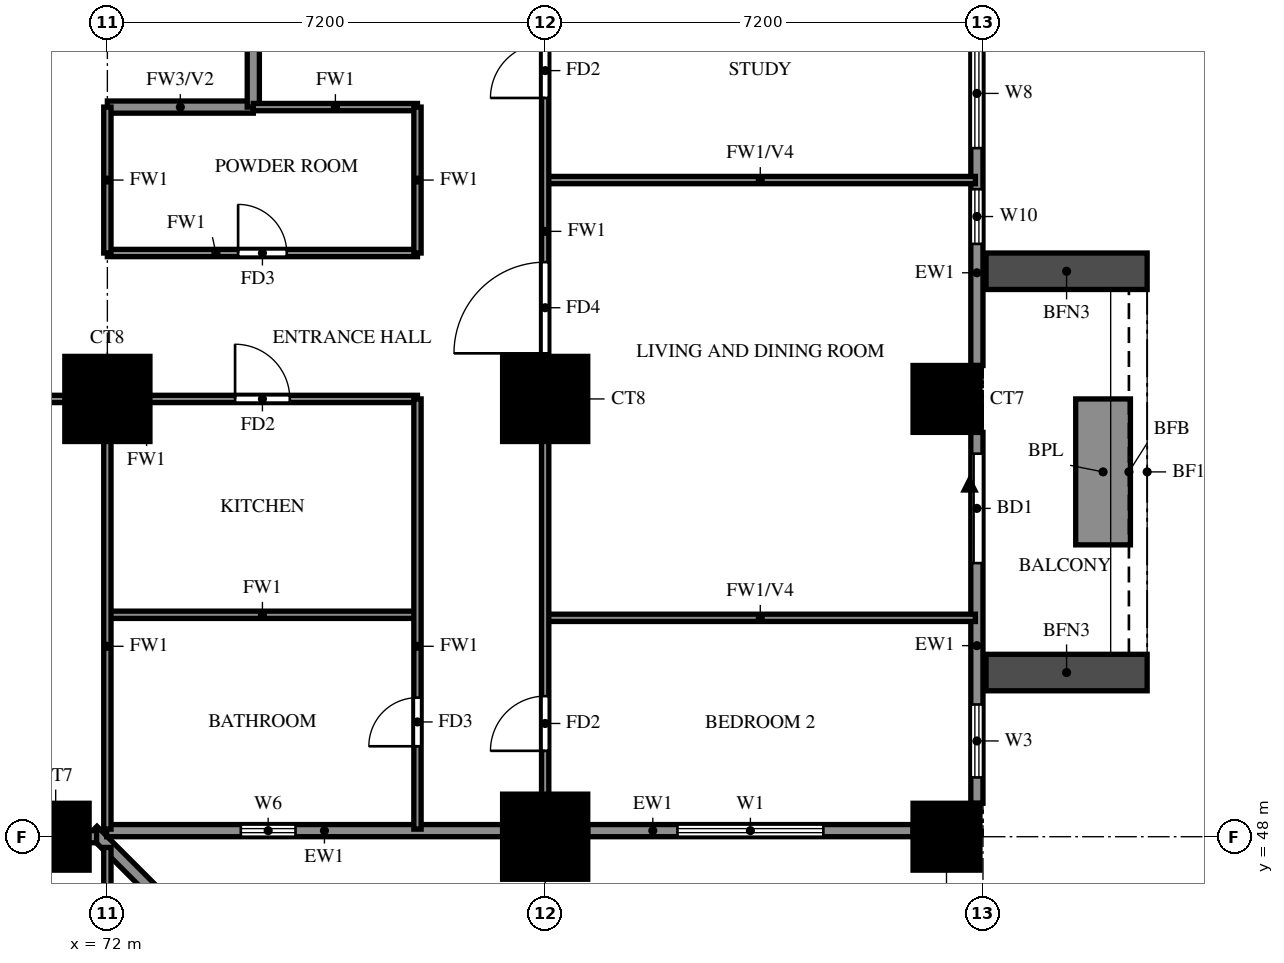
"""IFC4 building model, lengths in metres.
Left out: names, types, materials, properties, quantities, classifications, styles, units other than length and angle.
Written with IfcOpenShell. Run it as: python <this file> out.ifc"""

import sys

from ifc_helpers import new_model, si_unit, direction, frame, frame_2d, origin, origin_2d, place, context, subcontext, project, spatial, rectangle, extrude, source, transform, mapped, element, fill, save


model = new_model("IFC4")
c1 = context("Model", 3, precision=1e-05, world=origin(), true_north=direction((0.0, 1.0)))
c2 = subcontext(c1, "Body", "Model", "MODEL_VIEW")
j1 = project(units=[si_unit("LENGTHUNIT", "METRE"), si_unit("PLANEANGLEUNIT", "RADIAN")], contexts=[c1])
p1 = place(None, origin())
s1 = spatial("IfcSite", under=j1, at=p1, CompositionType="ELEMENT")
p2 = place(p1, origin())
s2 = spatial("IfcBuilding", under=s1, at=p2, CompositionType="ELEMENT")
p3 = place(p2, frame((0.0, 0.0, 44.5)))
s3 = spatial("IfcBuildingStorey", under=s2, at=p3, CompositionType="ELEMENT", Elevation=44.5)
m1 = source(origin(), c2, "Body", "SweptSolid", [
    extrude(rectangle(XDim=1.1, YDim=1.1, at=origin_2d()), origin(), (0.0, 0.0, 1.0), 3.18),
])
p4 = place(p3, frame((71.15, 48.0, 0.0), z_axis=(0.0, 0.0, 1.0), x_axis=(1.0, 0.0, 0.0)))
e1 = element("IfcColumn", 1, at=p4, inside=s3, PredefinedType="COLUMN", context=c2, shape_type="MappedRepresentation", body=[
    mapped(m1, transform((0.0, 0.0, 0.0))),
])
m2 = source(origin(), c2, "Body", "SweptSolid", [
    extrude(rectangle(XDim=1.4, YDim=1.4, at=origin_2d()), origin(), (0.0, 0.0, 1.0), 3.18),
])
p5 = place(p3, frame((79.2, 48.0, 0.0), z_axis=(0.0, 0.0, 1.0), x_axis=(1.0, 0.0, 0.0)))
e2 = element("IfcColumn", 2, at=p5, inside=s3, PredefinedType="COLUMN", context=c2, shape_type="MappedRepresentation", body=[
    mapped(m2, transform((0.0, 0.0, 0.0))),
])
p6 = place(p3, frame((85.8, 48.0, 0.0), z_axis=(0.0, 0.0, 1.0), x_axis=(1.0, 0.0, 0.0)))
e3 = element("IfcColumn", 3, at=p6, inside=s3, PredefinedType="COLUMN", context=c2, shape_type="MappedRepresentation", body=[
    mapped(m1, transform((0.0, 0.0, 0.0))),
])
for number, where, z_axis, x_axis in (
    (4, (72.0, 55.2, 0.0), (0.0, 0.0, 1.0), (1.0, 0.0, 0.0)),
    (5, (79.2, 55.2, 0.0), (0.0, 0.0, 1.0), (1.0, 0.0, 0.0)),
):
    element("IfcColumn", number, at=place(p3, frame(where, z_axis=z_axis, x_axis=x_axis)), inside=s3, PredefinedType="COLUMN", context=c2, shape_type="MappedRepresentation", body=[
        mapped(m2, transform((0.0, 0.0, 0.0))),
    ])
p7 = place(p3, frame((85.8, 55.2, 0.0), z_axis=(0.0, 0.0, 1.0), x_axis=(1.0, 0.0, 0.0)))
e6 = element("IfcColumn", 6, at=p7, inside=s3, PredefinedType="COLUMN", context=c2, shape_type="MappedRepresentation", body=[
    mapped(m1, transform((0.0, 0.0, 0.0))),
])
p8 = place(p3, frame((78.74, 41.118, 0.0), z_axis=(0.0, 0.0, 1.0), x_axis=(-0.707106781187, 0.707106781187, 0.0)))
e7 = element("IfcWall", 7, at=p8, inside=s3, PredefinedType="SOLIDWALL", context=c2, shape_type="SweptSolid", body=[
    extrude(rectangle(XDim=9.874, YDim=0.2, at=frame_2d((4.937, 0.0))), origin(), (0.0, 0.0, 1.0), 3.18),
])
p9 = place(p3, frame((71.989, 48.1, 0.0), z_axis=(0.0, 0.0, 1.0), x_axis=(1.0, 0.0, 0.0)))
e8 = element("IfcWall", 8, at=p9, inside=s3, PredefinedType="SOLIDWALL", context=c2, shape_type="SweptSolid", body=[
    extrude(rectangle(XDim=6.511, YDim=0.2, at=frame_2d((3.256, 0.0))), origin(), (0.0, 0.0, 1.0), 3.18),
])
p10 = place(p9, frame((2.206, 0.0, 1.5)))
e9 = element("IfcOpeningElement", 9, at=p10, cuts=e8, PredefinedType="OPENING", context=c2, shape_type="SweptSolid", body=[
    extrude(rectangle(XDim=0.9, YDim=0.9, at=frame_2d((0.45, 0.45))), frame((0.0, 0.11, 0.0), z_axis=(0.0, -1.0, 0.0), x_axis=(1.0, 0.0, 0.0)), (0.0, 0.0, 1.0), 0.22),
])
p11 = place(p3, frame((79.9, 48.1, 0.0), z_axis=(0.0, 0.0, 1.0), x_axis=(1.0, 0.0, 0.0)))
e10 = element("IfcWall", 10, at=p11, inside=s3, PredefinedType="SOLIDWALL", context=c2, shape_type="SweptSolid", body=[
    extrude(rectangle(XDim=5.35, YDim=0.2, at=frame_2d((2.675, 0.0))), origin(), (0.0, 0.0, 1.0), 3.18),
])
p12 = place(p11, frame((1.475, 0.0, 0.6)))
e11 = element("IfcOpeningElement", 11, at=p12, cuts=e10, PredefinedType="OPENING", context=c2, shape_type="SweptSolid", body=[
    extrude(rectangle(XDim=2.4, YDim=2.4, at=frame_2d((1.2, 1.2))), frame((0.0, 0.11, 0.0), z_axis=(0.0, -1.0, 0.0), x_axis=(1.0, 0.0, 0.0)), (0.0, 0.0, 1.0), 0.22),
])
p13 = place(p3, frame((86.3, 48.55, 0.0), z_axis=(0.0, 0.0, 1.0), x_axis=(0.0, 1.0, 0.0)))
e12 = element("IfcWall", 12, at=p13, inside=s3, PredefinedType="SOLIDWALL", context=c2, shape_type="SweptSolid", body=[
    extrude(rectangle(XDim=6.1, YDim=0.2, at=frame_2d((3.05, 0.0))), origin(), (0.0, 0.0, 1.0), 3.18),
])
p14 = place(p13, frame((3.95, 0.0, 0.0)))
e13 = element("IfcOpeningElement", 13, at=p14, cuts=e12, PredefinedType="OPENING", context=c2, shape_type="SweptSolid", body=[
    extrude(rectangle(XDim=1.8, YDim=2.4, at=frame_2d((0.9, 1.2))), frame((0.0, 0.11, 0.0), z_axis=(0.0, -1.0, 0.0), x_axis=(1.0, 0.0, 0.0)), (0.0, 0.0, 1.0), 0.22),
])
p15 = place(p13, frame((0.425, 0.0, 0.6)))
e14 = element("IfcOpeningElement", 14, at=p15, cuts=e12, PredefinedType="OPENING", context=c2, shape_type="SweptSolid", body=[
    extrude(rectangle(XDim=1.2, YDim=2.4, at=frame_2d((0.6, 1.2))), frame((0.0, 0.11, 0.0), z_axis=(0.0, -1.0, 0.0), x_axis=(1.0, 0.0, 0.0)), (0.0, 0.0, 1.0), 0.22),
])
p16 = place(p3, frame((86.3, 55.75, 0.0), z_axis=(0.0, 0.0, 1.0), x_axis=(0.0, 1.0, 0.0)))
e15 = element("IfcWall", 15, at=p16, inside=s3, PredefinedType="SOLIDWALL", context=c2, shape_type="SweptSolid", body=[
    extrude(rectangle(XDim=6.1, YDim=0.2, at=frame_2d((3.05, 0.0))), origin(), (0.0, 0.0, 1.0), 3.18),
])
p17 = place(p16, frame((2.0, 0.0, 0.6)))
e16 = element("IfcOpeningElement", 16, at=p17, cuts=e15, PredefinedType="OPENING", context=c2, shape_type="SweptSolid", body=[
    extrude(rectangle(XDim=0.9, YDim=2.4, at=frame_2d((0.45, 1.2))), frame((0.0, 0.11, 0.0), z_axis=(0.0, -1.0, 0.0), x_axis=(1.0, 0.0, 0.0)), (0.0, 0.0, 1.0), 0.22),
])
p18 = place(p16, frame((3.575, 0.0, 0.6)))
e17 = element("IfcOpeningElement", 17, at=p18, cuts=e15, PredefinedType="OPENING", context=c2, shape_type="SweptSolid", body=[
    extrude(rectangle(XDim=1.8, YDim=2.4, at=frame_2d((0.9, 1.2))), frame((0.0, 0.11, 0.0), z_axis=(0.0, -1.0, 0.0), x_axis=(1.0, 0.0, 0.0)), (0.0, 0.0, 1.0), 0.22),
])
for number, where, z_axis, x_axis in (
    (18, (86.45, 50.7, 0.0), (0.0, 0.0, 1.0), (1.0, 0.0, 0.0)),
    (19, (86.45, 57.3, 0.0), (0.0, 0.0, 1.0), (1.0, 0.0, 0.0)),
):
    element("IfcWall", number, at=place(p3, frame(where, z_axis=z_axis, x_axis=x_axis)), inside=s3, PredefinedType="SOLIDWALL", context=c2, shape_type="SweptSolid", body=[
        extrude(rectangle(XDim=2.65, YDim=0.6, at=frame_2d((1.325, 0.0))), origin(), (0.0, 0.0, 1.0), 2.85),
    ])
p19 = place(p3, frame((88.375, 52.8, 0.0), z_axis=(0.0, 0.0, 1.0), x_axis=(0.0, 1.0, 0.0)))
e20 = element("IfcWall", 20, at=p19, inside=s3, PredefinedType="SOLIDWALL", context=c2, shape_type="SweptSolid", body=[
    extrude(rectangle(XDim=2.4, YDim=0.9, at=frame_2d((1.2, 0.0))), origin(), (0.0, 0.0, 1.0), 0.9),
])
p20 = place(p3, frame((72.0, 60.0, 0.0), z_axis=(0.0, 0.0, 1.0), x_axis=(1.0, 0.0, 0.0)))
e21 = element("IfcWall", 21, at=p20, inside=s3, PredefinedType="SOLIDWALL", context=c2, shape_type="SweptSolid", body=[
    extrude(rectangle(XDim=2.4, YDim=0.2, at=frame_2d((1.2, 0.0))), origin(), (0.0, 0.0, 1.0), 3.18),
])
p21 = place(p3, frame((74.4, 60.0, 0.0), z_axis=(0.0, 0.0, 1.0), x_axis=(0.0, 1.0, 0.0)))
e22 = element("IfcWall", 22, at=p21, inside=s3, PredefinedType="SOLIDWALL", context=c2, shape_type="SweptSolid", body=[
    extrude(rectangle(XDim=9.45, YDim=0.2, at=frame_2d((4.725, 0.0))), origin(), (0.0, 0.0, 1.0), 3.18),
])
p22 = place(p21, frame((3.1, 0.0, 0.0)))
e23 = element("IfcOpeningElement", 23, at=p22, cuts=e22, PredefinedType="OPENING", context=c2, shape_type="SweptSolid", body=[
    extrude(rectangle(XDim=1.0, YDim=2.1, at=frame_2d((0.5, 1.05))), frame((0.0, 0.11, 0.0), z_axis=(0.0, -1.0, 0.0), x_axis=(1.0, 0.0, 0.0)), (0.0, 0.0, 1.0), 0.22),
])
p23 = place(p3, frame((67.2, 48.0, 0.0), z_axis=(0.0, 0.0, 1.0), x_axis=(1.0, 0.0, 0.0)))
e24 = element("IfcWall", 24, at=p23, inside=s3, PredefinedType="SOLIDWALL", context=c2, shape_type="SweptSolid", body=[
    extrude(rectangle(XDim=4.623, YDim=0.2, at=frame_2d((2.312, 0.0))), origin(), (0.0, 0.0, 1.0), 3.18),
])
p24 = place(p3, frame((79.2, 51.6, 0.0), z_axis=(0.0, 0.0, 1.0), x_axis=(1.0, 0.0, 0.0)))
e25 = element("IfcWall", 25, at=p24, inside=s3, PredefinedType="PARTITIONING", context=c2, shape_type="SweptSolid", body=[
    extrude(rectangle(XDim=7.075, YDim=0.12, at=frame_2d((3.538, 0.0))), origin(), (0.0, 0.0, 1.0), 2.28),
])
p25 = place(p3, frame((72.0, 51.65, 0.0), z_axis=(0.0, 0.0, 1.0), x_axis=(1.0, 0.0, 0.0)))
e26 = element("IfcWall", 26, at=p25, inside=s3, PredefinedType="PARTITIONING", context=c2, shape_type="SweptSolid", body=[
    extrude(rectangle(XDim=5.1, YDim=0.12, at=frame_2d((2.55, 0.0))), origin(), (0.0, 0.0, 1.0), 3.18),
])
p26 = place(p3, frame((67.2, 55.2, 0.0), z_axis=(0.0, 0.0, 1.0), x_axis=(1.0, 0.0, 0.0)))
e27 = element("IfcWall", 27, at=p26, inside=s3, PredefinedType="PARTITIONING", context=c2, shape_type="SweptSolid", body=[
    extrude(rectangle(XDim=9.9, YDim=0.12, at=frame_2d((4.95, 0.0))), origin(), (0.0, 0.0, 1.0), 3.18),
])
p27 = place(p26, frame((6.9, 0.0, 0.0)))
e28 = element("IfcOpeningElement", 28, at=p27, cuts=e27, PredefinedType="OPENING", context=c2, shape_type="SweptSolid", body=[
    extrude(rectangle(XDim=0.9, YDim=2.1, at=frame_2d((0.45, 1.05))), frame((0.0, 0.07, 0.0), z_axis=(0.0, -1.0, 0.0), x_axis=(1.0, 0.0, 0.0)), (0.0, 0.0, 1.0), 0.14),
])
p28 = place(p26, frame((1.95, 0.0, 0.0)))
e29 = element("IfcOpeningElement", 29, at=p28, cuts=e27, PredefinedType="OPENING", context=c2, shape_type="SweptSolid", body=[
    extrude(rectangle(XDim=0.9, YDim=2.1, at=frame_2d((0.45, 1.05))), frame((0.0, 0.07, 0.0), z_axis=(0.0, -1.0, 0.0), x_axis=(1.0, 0.0, 0.0)), (0.0, 0.0, 1.0), 0.14),
])
p29 = place(p3, frame((72.0, 57.6, 0.0), z_axis=(0.0, 0.0, 1.0), x_axis=(1.0, 0.0, 0.0)))
e30 = element("IfcWall", 30, at=p29, inside=s3, PredefinedType="PARTITIONING", context=c2, shape_type="SweptSolid", body=[
    extrude(rectangle(XDim=5.1, YDim=0.12, at=frame_2d((2.55, 0.0))), origin(), (0.0, 0.0, 1.0), 3.18),
])
p30 = place(p29, frame((2.15, 0.0, 0.0)))
e31 = element("IfcOpeningElement", 31, at=p30, cuts=e30, PredefinedType="OPENING", context=c2, shape_type="SweptSolid", body=[
    extrude(rectangle(XDim=0.8, YDim=2.1, at=frame_2d((0.4, 1.05))), frame((0.0, 0.07, 0.0), z_axis=(0.0, -1.0, 0.0), x_axis=(1.0, 0.0, 0.0)), (0.0, 0.0, 1.0), 0.14),
])
p31 = place(p3, frame((79.2, 58.8, 0.0), z_axis=(0.0, 0.0, 1.0), x_axis=(1.0, 0.0, 0.0)))
e32 = element("IfcWall", 32, at=p31, inside=s3, PredefinedType="PARTITIONING", context=c2, shape_type="SweptSolid", body=[
    extrude(rectangle(XDim=7.075, YDim=0.12, at=frame_2d((3.538, 0.0))), origin(), (0.0, 0.0, 1.0), 2.28),
])
p32 = place(p3, frame((74.4, 60.0, 0.0), z_axis=(0.0, 0.0, 1.0), x_axis=(1.0, 0.0, 0.0)))
e33 = element("IfcWall", 33, at=p32, inside=s3, PredefinedType="PARTITIONING", context=c2, shape_type="SweptSolid", body=[
    extrude(rectangle(XDim=2.7, YDim=0.12, at=frame_2d((1.35, 0.0))), origin(), (0.0, 0.0, 1.0), 3.18),
])
p33 = place(p3, frame((72.0, 33.725, 0.0), z_axis=(0.0, 0.0, 1.0), x_axis=(0.0, 1.0, 0.0)))
e34 = element("IfcWall", 34, at=p33, inside=s3, PredefinedType="PARTITIONING", context=c2, shape_type="SweptSolid", body=[
    extrude(rectangle(XDim=14.098, YDim=0.12, at=frame_2d((7.049, 0.0))), origin(), (0.0, 0.0, 1.0), 2.28),
])
p34 = place(p33, frame((10.075, 0.0, 0.0)))
e35 = element("IfcOpeningElement", 35, at=p34, cuts=e34, PredefinedType="OPENING", context=c2, shape_type="SweptSolid", body=[
    extrude(rectangle(XDim=0.9, YDim=2.1, at=frame_2d((0.45, 1.05))), frame((0.0, 0.07, 0.0), z_axis=(0.0, -1.0, 0.0), x_axis=(1.0, 0.0, 0.0)), (0.0, 0.0, 1.0), 0.14),
])
p35 = place(p3, frame((72.0, 48.125, 0.0), z_axis=(0.0, 0.0, 1.0), x_axis=(0.0, 1.0, 0.0)))
e36 = element("IfcWall", 36, at=p35, inside=s3, PredefinedType="PARTITIONING", context=c2, shape_type="SweptSolid", body=[
    extrude(rectangle(XDim=7.075, YDim=0.12, at=frame_2d((3.538, 0.0))), origin(), (0.0, 0.0, 1.0), 3.18),
])
p36 = place(p3, frame((72.0, 57.6, 0.0), z_axis=(0.0, 0.0, 1.0), x_axis=(0.0, 1.0, 0.0)))
e37 = element("IfcWall", 37, at=p36, inside=s3, PredefinedType="PARTITIONING", context=c2, shape_type="SweptSolid", body=[
    extrude(rectangle(XDim=2.4, YDim=0.12, at=frame_2d((1.2, 0.0))), origin(), (0.0, 0.0, 1.0), 3.18),
])
p37 = place(p3, frame((77.1, 48.125, 0.0), z_axis=(0.0, 0.0, 1.0), x_axis=(0.0, 1.0, 0.0)))
e38 = element("IfcWall", 38, at=p37, inside=s3, PredefinedType="PARTITIONING", context=c2, shape_type="SweptSolid", body=[
    extrude(rectangle(XDim=7.075, YDim=0.12, at=frame_2d((3.538, 0.0))), origin(), (0.0, 0.0, 1.0), 3.18),
])
p38 = place(p37, frame((1.363, 0.0, 0.0)))
e39 = element("IfcOpeningElement", 39, at=p38, cuts=e38, PredefinedType="OPENING", context=c2, shape_type="SweptSolid", body=[
    extrude(rectangle(XDim=0.8, YDim=2.1, at=frame_2d((0.4, 1.05))), frame((0.0, 0.07, 0.0), z_axis=(0.0, -1.0, 0.0), x_axis=(1.0, 0.0, 0.0)), (0.0, 0.0, 1.0), 0.14),
])
p39 = place(p3, frame((77.1, 57.6, 0.0), z_axis=(0.0, 0.0, 1.0), x_axis=(0.0, 1.0, 0.0)))
e40 = element("IfcWall", 40, at=p39, inside=s3, PredefinedType="PARTITIONING", context=c2, shape_type="SweptSolid", body=[
    extrude(rectangle(XDim=2.4, YDim=0.12, at=frame_2d((1.2, 0.0))), origin(), (0.0, 0.0, 1.0), 3.18),
])
p40 = place(p3, frame((79.2, 48.125, 0.0), z_axis=(0.0, 0.0, 1.0), x_axis=(0.0, 1.0, 0.0)))
e41 = element("IfcWall", 41, at=p40, inside=s3, PredefinedType="PARTITIONING", context=c2, shape_type="SweptSolid", body=[
    extrude(rectangle(XDim=17.875, YDim=0.12, at=frame_2d((8.938, 0.0))), origin(), (0.0, 0.0, 1.0), 3.18),
])
p41 = place(p40, frame((1.288, 0.0, 0.0)))
e42 = element("IfcOpeningElement", 42, at=p41, cuts=e41, PredefinedType="OPENING", context=c2, shape_type="SweptSolid", body=[
    extrude(rectangle(XDim=0.9, YDim=2.1, at=frame_2d((0.45, 1.05))), frame((0.0, 0.07, 0.0), z_axis=(0.0, -1.0, 0.0), x_axis=(1.0, 0.0, 0.0)), (0.0, 0.0, 1.0), 0.14),
])
p42 = place(p40, frame((7.825, 0.0, 0.0)))
e43 = element("IfcOpeningElement", 43, at=p42, cuts=e41, PredefinedType="OPENING", context=c2, shape_type="SweptSolid", body=[
    extrude(rectangle(XDim=1.5, YDim=2.1, at=frame_2d((0.75, 1.05))), frame((0.0, 0.07, 0.0), z_axis=(0.0, -1.0, 0.0), x_axis=(1.0, 0.0, 0.0)), (0.0, 0.0, 1.0), 0.14),
])
p43 = place(p40, frame((12.025, 0.0, 0.0)))
e44 = element("IfcOpeningElement", 44, at=p43, cuts=e41, PredefinedType="OPENING", context=c2, shape_type="SweptSolid", body=[
    extrude(rectangle(XDim=0.9, YDim=2.1, at=frame_2d((0.45, 1.05))), frame((0.0, 0.07, 0.0), z_axis=(0.0, -1.0, 0.0), x_axis=(1.0, 0.0, 0.0)), (0.0, 0.0, 1.0), 0.14),
])
p44 = place(p40, frame((15.625, 0.0, 0.0)))
e45 = element("IfcOpeningElement", 45, at=p44, cuts=e41, PredefinedType="OPENING", context=c2, shape_type="SweptSolid", body=[
    extrude(rectangle(XDim=0.9, YDim=2.1, at=frame_2d((0.45, 1.05))), frame((0.0, 0.07, 0.0), z_axis=(0.0, -1.0, 0.0), x_axis=(1.0, 0.0, 0.0)), (0.0, 0.0, 1.0), 0.14),
])
p45 = place(p10, origin())
e46 = element("IfcWindow", 46, at=p45, inside=s3, PartitioningType="SINGLE_PANEL", PredefinedType="WINDOW", context=c2, shape_type="SweptSolid", body=[
    extrude(rectangle(XDim=0.9, YDim=0.9, at=frame_2d((0.45, 0.45))), frame((0.0, 0.03, 0.0), z_axis=(0.0, -1.0, 0.0), x_axis=(1.0, 0.0, 0.0)), (0.0, 0.0, 1.0), 0.06),
])
fill(e9, e46)
p46 = place(p12, origin())
e47 = element("IfcWindow", 47, at=p46, inside=s3, PartitioningType="DOUBLE_PANEL_VERTICAL", PredefinedType="WINDOW", context=c2, shape_type="SweptSolid", body=[
    extrude(rectangle(XDim=2.4, YDim=2.4, at=frame_2d((1.2, 1.2))), frame((0.0, 0.03, 0.0), z_axis=(0.0, -1.0, 0.0), x_axis=(1.0, 0.0, 0.0)), (0.0, 0.0, 1.0), 0.06),
])
fill(e11, e47)
p47 = place(p14, origin())
e48 = element("IfcDoor", 48, at=p47, inside=s3, OperationType="DOUBLE_DOOR_SLIDING", PredefinedType="DOOR", context=c2, shape_type="SweptSolid", body=[
    extrude(rectangle(XDim=1.8, YDim=2.4, at=frame_2d((0.9, 1.2))), frame((0.0, 0.025, 0.0), z_axis=(0.0, -1.0, 0.0), x_axis=(1.0, 0.0, 0.0)), (0.0, 0.0, 1.0), 0.05),
])
fill(e13, e48)
p48 = place(p15, origin())
e49 = element("IfcWindow", 49, at=p48, inside=s3, PartitioningType="SINGLE_PANEL", PredefinedType="WINDOW", context=c2, shape_type="SweptSolid", body=[
    extrude(rectangle(XDim=1.2, YDim=2.4, at=frame_2d((0.6, 1.2))), frame((0.0, 0.03, 0.0), z_axis=(0.0, -1.0, 0.0), x_axis=(1.0, 0.0, 0.0)), (0.0, 0.0, 1.0), 0.06),
])
fill(e14, e49)
p49 = place(p17, origin())
e50 = element("IfcWindow", 50, at=p49, inside=s3, PartitioningType="SINGLE_PANEL", PredefinedType="WINDOW", context=c2, shape_type="SweptSolid", body=[
    extrude(rectangle(XDim=0.9, YDim=2.4, at=frame_2d((0.45, 1.2))), frame((0.0, 0.03, 0.0), z_axis=(0.0, -1.0, 0.0), x_axis=(1.0, 0.0, 0.0)), (0.0, 0.0, 1.0), 0.06),
])
fill(e16, e50)
p50 = place(p18, origin())
e51 = element("IfcWindow", 51, at=p50, inside=s3, PartitioningType="DOUBLE_PANEL_VERTICAL", PredefinedType="WINDOW", context=c2, shape_type="SweptSolid", body=[
    extrude(rectangle(XDim=1.8, YDim=2.4, at=frame_2d((0.9, 1.2))), frame((0.0, 0.03, 0.0), z_axis=(0.0, -1.0, 0.0), x_axis=(1.0, 0.0, 0.0)), (0.0, 0.0, 1.0), 0.06),
])
fill(e17, e51)
p51 = place(p41, origin())
e52 = element("IfcDoor", 52, at=p51, inside=s3, OperationType="SINGLE_SWING_LEFT", PredefinedType="DOOR", context=c2, shape_type="SweptSolid", body=[
    extrude(rectangle(XDim=0.9, YDim=2.1, at=frame_2d((0.45, 1.05))), frame((0.0, 0.025, 0.0), z_axis=(0.0, -1.0, 0.0), x_axis=(1.0, 0.0, 0.0)), (0.0, 0.0, 1.0), 0.05),
])
fill(e42, e52)
p52 = place(p42, origin())
e53 = element("IfcDoor", 53, at=p52, inside=s3, OperationType="SINGLE_SWING_LEFT", PredefinedType="DOOR", context=c2, shape_type="SweptSolid", body=[
    extrude(rectangle(XDim=1.5, YDim=2.1, at=frame_2d((0.75, 1.05))), frame((0.0, 0.025, 0.0), z_axis=(0.0, -1.0, 0.0), x_axis=(1.0, 0.0, 0.0)), (0.0, 0.0, 1.0), 0.05),
])
fill(e43, e53)
p53 = place(p43, origin())
e54 = element("IfcDoor", 54, at=p53, inside=s3, OperationType="SINGLE_SWING_LEFT", PredefinedType="DOOR", context=c2, shape_type="SweptSolid", body=[
    extrude(rectangle(XDim=0.9, YDim=2.1, at=frame_2d((0.45, 1.05))), frame((0.0, 0.025, 0.0), z_axis=(0.0, -1.0, 0.0), x_axis=(1.0, 0.0, 0.0)), (0.0, 0.0, 1.0), 0.05),
])
fill(e44, e54)
p54 = place(p38, origin())
e55 = element("IfcDoor", 55, at=p54, inside=s3, OperationType="SINGLE_SWING_LEFT", PredefinedType="DOOR", context=c2, shape_type="SweptSolid", body=[
    extrude(rectangle(XDim=0.8, YDim=2.1, at=frame_2d((0.4, 1.05))), frame((0.0, 0.025, 0.0), z_axis=(0.0, -1.0, 0.0), x_axis=(1.0, 0.0, 0.0)), (0.0, 0.0, 1.0), 0.05),
])
fill(e39, e55)
p55 = place(p27, origin())
e56 = element("IfcDoor", 56, at=p55, inside=s3, OperationType="SINGLE_SWING_RIGHT", PredefinedType="DOOR", context=c2, shape_type="SweptSolid", body=[
    extrude(rectangle(XDim=0.9, YDim=2.1, at=frame_2d((0.45, 1.05))), frame((0.0, 0.025, 0.0), z_axis=(0.0, -1.0, 0.0), x_axis=(1.0, 0.0, 0.0)), (0.0, 0.0, 1.0), 0.05),
])
fill(e28, e56)
p56 = place(p30, origin())
e57 = element("IfcDoor", 57, at=p56, inside=s3, OperationType="SINGLE_SWING_LEFT", PredefinedType="DOOR", context=c2, shape_type="SweptSolid", body=[
    extrude(rectangle(XDim=0.8, YDim=2.1, at=frame_2d((0.4, 1.05))), frame((0.0, 0.025, 0.0), z_axis=(0.0, -1.0, 0.0), x_axis=(1.0, 0.0, 0.0)), (0.0, 0.0, 1.0), 0.05),
])
fill(e31, e57)
save(model, sys.argv[1])
